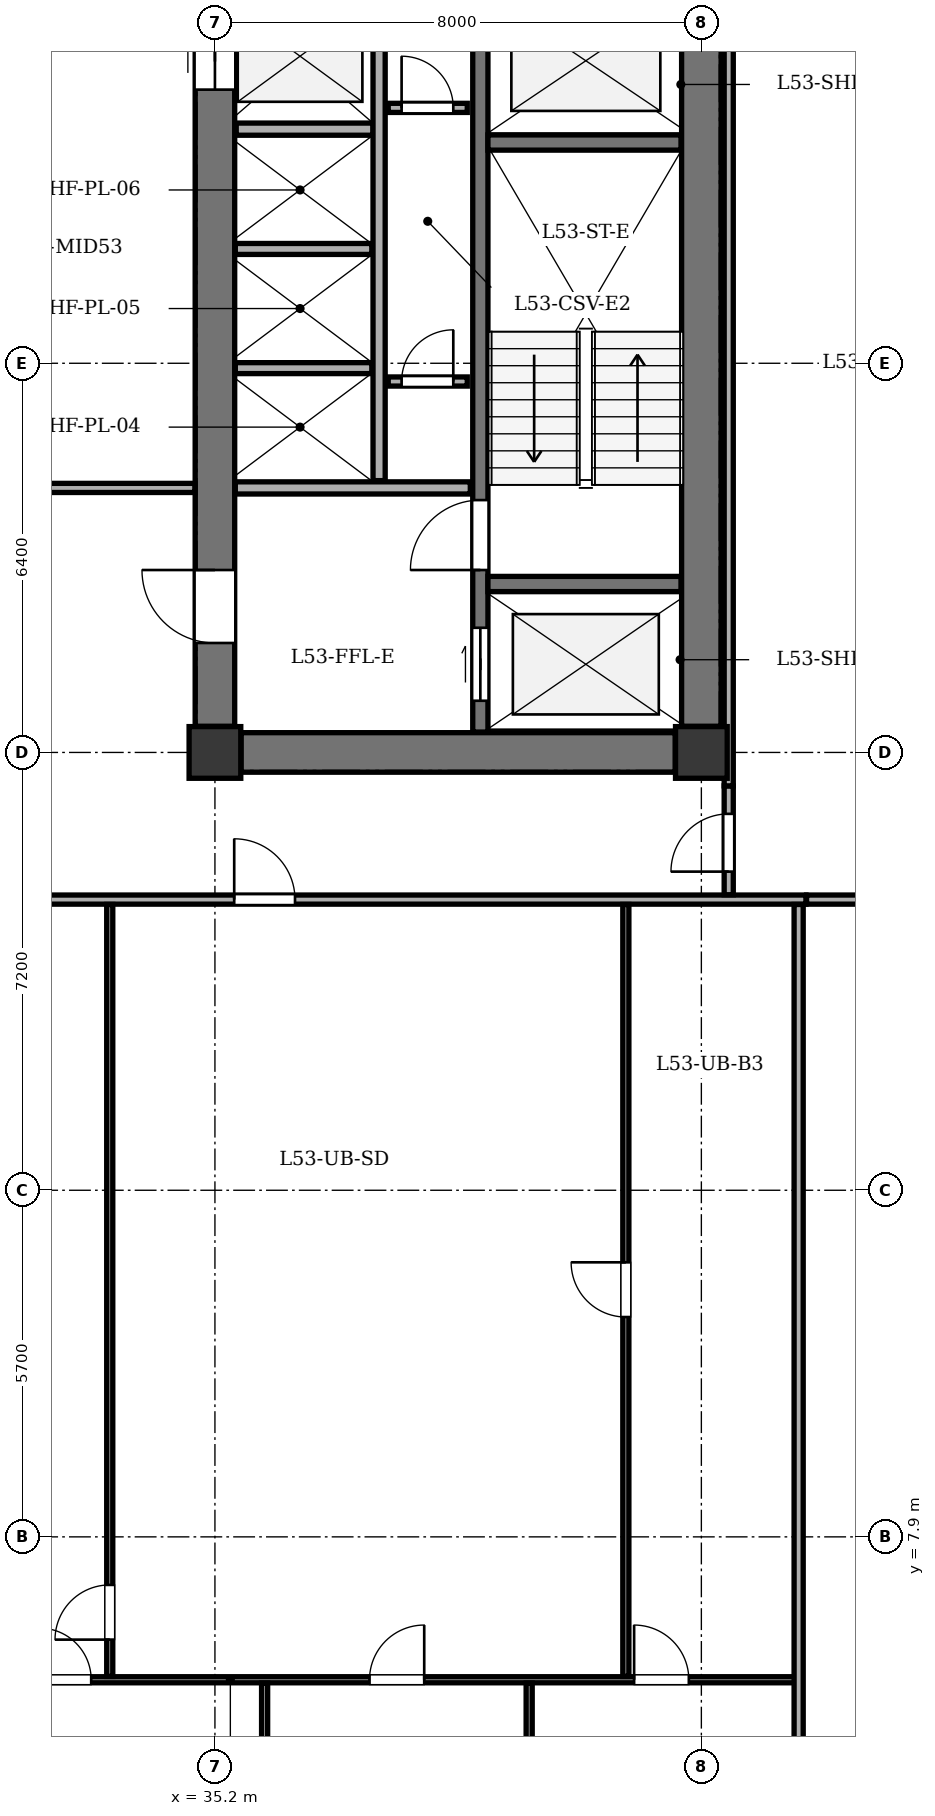
"""IFC4 building model, lengths in metres.
Left out: names, types, materials, properties, quantities, classifications, styles, units other than length and angle.
Written with IfcOpenShell. Run it as: python <this file> out.ifc"""

import sys

from ifc_helpers import new_model, si_unit, direction, frame, frame_2d, origin, origin_2d, place, context, subcontext, project, spatial, rectangle, extrude, element, fill, save


model = new_model("IFC4")
c1 = context("Model", 3, precision=1e-05, world=origin(), true_north=direction((0.0, 1.0)))
c2 = subcontext(c1, "Body", "Model", "MODEL_VIEW")
j1 = project(units=[si_unit("LENGTHUNIT", "METRE"), si_unit("PLANEANGLEUNIT", "RADIAN")], contexts=[c1])
p1 = place(None, origin())
s1 = spatial("IfcSite", under=j1, at=p1, CompositionType="ELEMENT")
p2 = place(p1, origin())
s2 = spatial("IfcBuilding", under=s1, at=p2, CompositionType="ELEMENT")
p3 = place(p2, frame((0.0, 0.0, 207.5)))
s3 = spatial("IfcBuildingStorey", under=s2, at=p3, CompositionType="ELEMENT", Elevation=207.5)
for number, where, z_axis, x_axis in (
    (1, (35.2, 20.8, 0.0), (0.0, 0.0, 1.0), (1.0, 0.0, 0.0)),
    (2, (43.2, 20.8, 0.0), (0.0, 0.0, 1.0), (1.0, 0.0, 0.0)),
):
    element("IfcColumn", number, at=place(p3, frame(where, z_axis=z_axis, x_axis=x_axis)), inside=s3, PredefinedType="COLUMN", context=c2, shape_type="SweptSolid", body=[
        extrude(rectangle(XDim=0.85, YDim=0.85, at=origin_2d()), origin(), (0.0, 0.0, 1.0), 3.4),
    ])
p4 = place(p3, frame((49.12, 7.2, 0.0), z_axis=(0.0, 0.0, 1.0), x_axis=(-0.707106781187, -0.707106781187, 0.0)))
e3 = element("IfcWall", 3, at=p4, inside=s3, PredefinedType="STANDARD", context=c2, shape_type="SweptSolid", body=[
    extrude(rectangle(XDim=6.11, YDim=0.32, at=frame_2d((3.055, 0.0))), origin(), (0.0, 0.0, 1.0), 2.725),
])
p5 = place(p4, frame((2.355, 0.0, 0.75)))
e4 = element("IfcOpeningElement", 4, at=p5, cuts=e3, PredefinedType="OPENING", context=c2, shape_type="SweptSolid", body=[
    extrude(rectangle(XDim=1.4, YDim=1.65, at=frame_2d((0.7, 0.825))), frame((0.0, 0.17, 0.0), z_axis=(0.0, -1.0, 0.0), x_axis=(1.0, 0.0, 0.0)), (0.0, 0.0, 1.0), 0.34),
])
p6 = place(p3, frame((43.2, 21.23, 0.0), z_axis=(0.0, 0.0, 1.0), x_axis=(0.0, 1.0, 0.0)))
e5 = element("IfcWall", 5, at=p6, inside=s3, PredefinedType="SHEAR", context=c2, shape_type="SweptSolid", body=[
    extrude(rectangle(XDim=11.94, YDim=0.65, at=frame_2d((5.97, 0.0))), origin(), (0.0, 0.0, 1.0), 3.1),
])
p7 = place(p3, frame((35.63, 20.8, 0.0), z_axis=(0.0, 0.0, 1.0), x_axis=(1.0, 0.0, 0.0)))
e6 = element("IfcWall", 6, at=p7, inside=s3, PredefinedType="SHEAR", context=c2, shape_type="SweptSolid", body=[
    extrude(rectangle(XDim=7.14, YDim=0.65, at=frame_2d((3.57, 0.0))), origin(), (0.0, 0.0, 1.0), 3.1),
])
p8 = place(p3, frame((35.2, 21.23, 0.0), z_axis=(0.0, 0.0, 1.0), x_axis=(0.0, 1.0, 0.0)))
e7 = element("IfcWall", 7, at=p8, inside=s3, PredefinedType="SHEAR", context=c2, shape_type="SweptSolid", body=[
    extrude(rectangle(XDim=11.94, YDim=0.65, at=frame_2d((5.97, 0.0))), origin(), (0.0, 0.0, 1.0), 3.1),
])
p9 = place(p8, frame((1.37, 0.0, 0.0)))
e8 = element("IfcOpeningElement", 8, at=p9, cuts=e7, PredefinedType="OPENING", context=c2, shape_type="SweptSolid", body=[
    extrude(rectangle(XDim=1.2, YDim=2.15, at=frame_2d((0.6, 1.075))), frame((0.0, 0.335, 0.0), z_axis=(0.0, -1.0, 0.0), x_axis=(1.0, 0.0, 0.0)), (0.0, 0.0, 1.0), 0.67),
])
p10 = place(p8, frame((10.47, 0.0, 0.0)))
e9 = element("IfcOpeningElement", 9, at=p10, cuts=e7, PredefinedType="OPENING", context=c2, shape_type="SweptSolid", body=[
    extrude(rectangle(XDim=1.1, YDim=2.1, at=frame_2d((0.55, 1.05))), frame((0.0, 0.335, 0.0), z_axis=(0.0, -1.0, 0.0), x_axis=(1.0, 0.0, 0.0)), (0.0, 0.0, 1.0), 0.67),
])
p11 = place(p3, frame((39.565, 21.135, 0.0), z_axis=(0.0, 0.0, 1.0), x_axis=(0.0, 1.0, 0.0)))
e10 = element("IfcWall", 10, at=p11, inside=s3, PredefinedType="SHEAR", context=c2, shape_type="SweptSolid", body=[
    extrude(rectangle(XDim=12.13, YDim=0.25, at=frame_2d((6.065, 0.0))), origin(), (0.0, 0.0, 1.0), 3.1),
])
p12 = place(p11, frame((0.515, 0.0, 0.0)))
e11 = element("IfcOpeningElement", 11, at=p12, cuts=e10, PredefinedType="OPENING", context=c2, shape_type="SweptSolid", body=[
    extrude(rectangle(XDim=1.2, YDim=2.15, at=frame_2d((0.6, 1.075))), frame((0.0, 0.135, 0.0), z_axis=(0.0, -1.0, 0.0), x_axis=(1.0, 0.0, 0.0)), (0.0, 0.0, 1.0), 0.27),
])
p13 = place(p11, frame((2.665, 0.0, 0.0)))
e12 = element("IfcOpeningElement", 12, at=p13, cuts=e10, PredefinedType="OPENING", context=c2, shape_type="SweptSolid", body=[
    extrude(rectangle(XDim=1.15, YDim=2.15, at=frame_2d((0.575, 1.075))), frame((0.0, 0.135, 0.0), z_axis=(0.0, -1.0, 0.0), x_axis=(1.0, 0.0, 0.0)), (0.0, 0.0, 1.0), 0.27),
])
for number, where, z_axis, x_axis in (
    (13, (39.69, 23.57, 0.0), (0.0, 0.0, 1.0), (1.0, 0.0, 0.0)),
    (14, (39.69, 30.83, 0.0), (0.0, 0.0, 1.0), (1.0, 0.0, 0.0)),
):
    element("IfcWall", number, at=place(p3, frame(where, z_axis=z_axis, x_axis=x_axis)), inside=s3, PredefinedType="SHEAR", context=c2, shape_type="SweptSolid", body=[
        extrude(rectangle(XDim=3.175, YDim=0.25, at=frame_2d((1.587, 0.0))), origin(), (0.0, 0.0, 1.0), 3.1),
    ])
p14 = place(p3, frame((35.535, 25.15, 0.0), z_axis=(0.0, 0.0, 1.0), x_axis=(1.0, 0.0, 0.0)))
e15 = element("IfcWall", 15, at=p14, inside=s3, PredefinedType="SOLIDWALL", context=c2, shape_type="SweptSolid", body=[
    extrude(rectangle(XDim=3.865, YDim=0.2, at=frame_2d((1.933, 0.0))), origin(), (0.0, 0.0, 1.0), 3.1),
])
p15 = place(p3, frame((35.55, 31.05, 0.0), z_axis=(0.0, 0.0, 1.0), x_axis=(1.0, 0.0, 0.0)))
e16 = element("IfcWall", 16, at=p15, inside=s3, PredefinedType="SOLIDWALL", context=c2, shape_type="SweptSolid", body=[
    extrude(rectangle(XDim=2.25, YDim=0.2, at=frame_2d((1.125, 0.0))), origin(), (0.0, 0.0, 1.0), 3.1),
])
p16 = place(p3, frame((37.9, 25.27, 0.0), z_axis=(0.0, 0.0, 1.0), x_axis=(0.0, 1.0, 0.0)))
e17 = element("IfcWall", 17, at=p16, inside=s3, PredefinedType="SOLIDWALL", context=c2, shape_type="SweptSolid", body=[
    extrude(rectangle(XDim=7.995, YDim=0.2, at=frame_2d((3.998, 0.0))), origin(), (0.0, 0.0, 1.0), 3.1),
])
for number, where, z_axis, x_axis in (
    (18, (35.535, 27.12, 0.0), (0.0, 0.0, 1.0), (1.0, 0.0, 0.0)),
    (19, (35.535, 29.08, 0.0), (0.0, 0.0, 1.0), (1.0, 0.0, 0.0)),
):
    element("IfcWall", number, at=place(p3, frame(where, z_axis=z_axis, x_axis=x_axis)), inside=s3, PredefinedType="PARTITIONING", context=c2, shape_type="SweptSolid", body=[
        extrude(rectangle(XDim=2.245, YDim=0.18, at=frame_2d((1.123, 0.0))), origin(), (0.0, 0.0, 1.0), 3.1),
    ])
p17 = place(p3, frame((38.05, 26.9, 0.0), z_axis=(0.0, 0.0, 1.0), x_axis=(1.0, 0.0, 0.0)))
e20 = element("IfcWall", 20, at=p17, inside=s3, PredefinedType="PARTITIONING", context=c2, shape_type="SweptSolid", body=[
    extrude(rectangle(XDim=1.3, YDim=0.15, at=frame_2d((0.65, 0.0))), origin(), (0.0, 0.0, 1.0), 3.1),
])
p18 = place(p17, frame((0.22, 0.0, 0.0)))
e21 = element("IfcOpeningElement", 21, at=p18, cuts=e20, PredefinedType="OPENING", context=c2, shape_type="SweptSolid", body=[
    extrude(rectangle(XDim=0.85, YDim=2.02, at=frame_2d((0.425, 1.01))), frame((0.0, 0.085, 0.0), z_axis=(0.0, -1.0, 0.0), x_axis=(1.0, 0.0, 0.0)), (0.0, 0.0, 1.0), 0.17),
])
p19 = place(p3, frame((38.05, 31.4, 0.0), z_axis=(0.0, 0.0, 1.0), x_axis=(1.0, 0.0, 0.0)))
e22 = element("IfcWall", 22, at=p19, inside=s3, PredefinedType="PARTITIONING", context=c2, shape_type="SweptSolid", body=[
    extrude(rectangle(XDim=1.3, YDim=0.15, at=frame_2d((0.65, 0.0))), origin(), (0.0, 0.0, 1.0), 3.1),
])
p20 = place(p19, frame((0.22, 0.0, 0.0)))
e23 = element("IfcOpeningElement", 23, at=p20, cuts=e22, PredefinedType="OPENING", context=c2, shape_type="SweptSolid", body=[
    extrude(rectangle(XDim=0.85, YDim=2.02, at=frame_2d((0.425, 1.01))), frame((0.0, 0.085, 0.0), z_axis=(0.0, -1.0, 0.0), x_axis=(1.0, 0.0, 0.0)), (0.0, 0.0, 1.0), 0.17),
])
p21 = place(p3, frame((29.35, 25.15, 0.0), z_axis=(0.0, 0.0, 1.0), x_axis=(1.0, 0.0, 0.0)))
e24 = element("IfcWall", 24, at=p21, inside=s3, PredefinedType="PARTITIONING", context=c2, shape_type="SweptSolid", body=[
    extrude(rectangle(XDim=5.52, YDim=0.15, at=frame_2d((2.76, 0.0))), origin(), (0.0, 0.0, 1.0), 3.1),
])
p22 = place(p3, frame((10.9, 18.38, 0.0), z_axis=(0.0, 0.0, 1.0), x_axis=(1.0, 0.0, 0.0)))
e25 = element("IfcWall", 25, at=p22, inside=s3, PredefinedType="PARTITIONING", context=c2, shape_type="SweptSolid", body=[
    extrude(rectangle(XDim=34.02, YDim=0.15, at=frame_2d((17.01, 0.0))), origin(), (0.0, 0.0, 1.0), 3.1),
])
p23 = place(p22, frame((7.727, 0.0, 0.0)))
e26 = element("IfcOpeningElement", 26, at=p23, cuts=e25, PredefinedType="OPENING", context=c2, shape_type="SweptSolid", body=[
    extrude(rectangle(XDim=1.0, YDim=2.1, at=frame_2d((0.5, 1.05))), frame((0.0, 0.085, 0.0), z_axis=(0.0, -1.0, 0.0), x_axis=(1.0, 0.0, 0.0)), (0.0, 0.0, 1.0), 0.17),
])
p24 = place(p22, frame((24.617, 0.0, 0.0)))
e27 = element("IfcOpeningElement", 27, at=p24, cuts=e25, PredefinedType="OPENING", context=c2, shape_type="SweptSolid", body=[
    extrude(rectangle(XDim=1.0, YDim=2.1, at=frame_2d((0.5, 1.05))), frame((0.0, 0.085, 0.0), z_axis=(0.0, -1.0, 0.0), x_axis=(1.0, 0.0, 0.0)), (0.0, 0.0, 1.0), 0.17),
])
p25 = place(p3, frame((27.314, 5.55, 0.0), z_axis=(0.0, 0.0, 1.0), x_axis=(1.0, 0.0, 0.0)))
e28 = element("IfcWall", 28, at=p25, inside=s3, PredefinedType="PARTITIONING", context=c2, shape_type="SweptSolid", body=[
    extrude(rectangle(XDim=17.526, YDim=0.1, at=frame_2d((8.763, 0.0))), origin(), (0.0, 0.0, 1.0), 3.1),
])
p26 = place(p25, frame((0.65, 0.0, 0.0)))
e29 = element("IfcOpeningElement", 29, at=p26, cuts=e28, PredefinedType="OPENING", context=c2, shape_type="SweptSolid", body=[
    extrude(rectangle(XDim=0.85, YDim=2.05, at=frame_2d((0.425, 1.025))), frame((0.0, 0.06, 0.0), z_axis=(0.0, -1.0, 0.0), x_axis=(1.0, 0.0, 0.0)), (0.0, 0.0, 1.0), 0.12),
])
p27 = place(p25, frame((5.001, 0.0, 0.0)))
e30 = element("IfcOpeningElement", 30, at=p27, cuts=e28, PredefinedType="OPENING", context=c2, shape_type="SweptSolid", body=[
    extrude(rectangle(XDim=0.85, YDim=2.05, at=frame_2d((0.425, 1.025))), frame((0.0, 0.06, 0.0), z_axis=(0.0, -1.0, 0.0), x_axis=(1.0, 0.0, 0.0)), (0.0, 0.0, 1.0), 0.12),
])
p28 = place(p25, frame((10.428, 0.0, 0.0)))
e31 = element("IfcOpeningElement", 31, at=p28, cuts=e28, PredefinedType="OPENING", context=c2, shape_type="SweptSolid", body=[
    extrude(rectangle(XDim=0.9, YDim=2.05, at=frame_2d((0.45, 1.025))), frame((0.0, 0.06, 0.0), z_axis=(0.0, -1.0, 0.0), x_axis=(1.0, 0.0, 0.0)), (0.0, 0.0, 1.0), 0.12),
])
p29 = place(p25, frame((14.78, 0.0, 0.0)))
e32 = element("IfcOpeningElement", 32, at=p29, cuts=e28, PredefinedType="OPENING", context=c2, shape_type="SweptSolid", body=[
    extrude(rectangle(XDim=0.9, YDim=2.05, at=frame_2d((0.45, 1.025))), frame((0.0, 0.06, 0.0), z_axis=(0.0, -1.0, 0.0), x_axis=(1.0, 0.0, 0.0)), (0.0, 0.0, 1.0), 0.12),
])
p30 = place(p3, frame((41.958, 5.605, 0.0), z_axis=(0.0, 0.0, 1.0), x_axis=(0.0, 1.0, 0.0)))
e33 = element("IfcWall", 33, at=p30, inside=s3, PredefinedType="PARTITIONING", context=c2, shape_type="SweptSolid", body=[
    extrude(rectangle(XDim=12.695, YDim=0.1, at=frame_2d((6.348, 0.0))), origin(), (0.0, 0.0, 1.0), 2.725),
])
p31 = place(p30, frame((5.91, 0.0, 0.0)))
e34 = element("IfcOpeningElement", 34, at=p31, cuts=e33, PredefinedType="OPENING", context=c2, shape_type="SweptSolid", body=[
    extrude(rectangle(XDim=0.9, YDim=2.05, at=frame_2d((0.45, 1.025))), frame((0.0, 0.06, 0.0), z_axis=(0.0, -1.0, 0.0), x_axis=(1.0, 0.0, 0.0)), (0.0, 0.0, 1.0), 0.12),
])
p32 = place(p3, frame((33.47, 5.605, 0.0), z_axis=(0.0, 0.0, 1.0), x_axis=(0.0, 1.0, 0.0)))
e35 = element("IfcWall", 35, at=p32, inside=s3, PredefinedType="PARTITIONING", context=c2, shape_type="SweptSolid", body=[
    extrude(rectangle(XDim=12.695, YDim=0.1, at=frame_2d((6.348, 0.0))), origin(), (0.0, 0.0, 1.0), 2.725),
])
p33 = place(p32, frame((0.605, 0.0, 0.0)))
e36 = element("IfcOpeningElement", 36, at=p33, cuts=e35, PredefinedType="OPENING", context=c2, shape_type="SweptSolid", body=[
    extrude(rectangle(XDim=0.9, YDim=2.05, at=frame_2d((0.45, 1.025))), frame((0.0, 0.06, 0.0), z_axis=(0.0, -1.0, 0.0), x_axis=(1.0, 0.0, 0.0)), (0.0, 0.0, 1.0), 0.12),
])
p34 = place(p3, frame((36.017, 3.045, 0.0), z_axis=(0.0, 0.0, 1.0), x_axis=(0.0, 1.0, 0.0)))
e37 = element("IfcWall", 37, at=p34, inside=s3, PredefinedType="PARTITIONING", context=c2, shape_type="SweptSolid", body=[
    extrude(rectangle(XDim=2.45, YDim=0.1, at=frame_2d((1.225, 0.0))), origin(), (0.0, 0.0, 1.0), 3.1),
])
p35 = place(p3, frame((40.368, 3.045, 0.0), z_axis=(0.0, 0.0, 1.0), x_axis=(0.0, 1.0, 0.0)))
e38 = element("IfcWall", 38, at=p35, inside=s3, PredefinedType="PARTITIONING", context=c2, shape_type="SweptSolid", body=[
    extrude(rectangle(XDim=2.45, YDim=0.1, at=frame_2d((1.225, 0.0))), origin(), (0.0, 0.0, 1.0), 2.725),
])
p36 = place(p3, frame((44.8, 3.045, 0.0), z_axis=(0.0, 0.0, 1.0), x_axis=(0.0, 1.0, 0.0)))
e39 = element("IfcWall", 39, at=p36, inside=s3, PredefinedType="PARTITIONING", context=c2, shape_type="SweptSolid", body=[
    extrude(rectangle(XDim=15.255, YDim=0.15, at=frame_2d((7.627, 0.0))), origin(), (0.0, 0.0, 1.0), 3.1),
])
p37 = place(p3, frame((44.93, 18.38, 0.0), z_axis=(0.0, 0.0, 1.0), x_axis=(1.0, 0.0, 0.0)))
e40 = element("IfcWall", 40, at=p37, inside=s3, PredefinedType="PARTITIONING", context=c2, shape_type="SweptSolid", body=[
    extrude(rectangle(XDim=4.025, YDim=0.15, at=frame_2d((2.013, 0.0))), origin(), (0.0, 0.0, 1.0), 3.1),
])
p38 = place(p3, frame((43.65, 18.46, 0.0), z_axis=(0.0, 0.0, 1.0), x_axis=(0.0, 1.0, 0.0)))
e41 = element("IfcWall", 41, at=p38, inside=s3, PredefinedType="PARTITIONING", context=c2, shape_type="SweptSolid", body=[
    extrude(rectangle(XDim=1.79, YDim=0.15, at=frame_2d((0.895, 0.0))), origin(), (0.0, 0.0, 1.0), 3.1),
])
p39 = place(p38, frame((0.38, 0.0, 0.0)))
e42 = element("IfcOpeningElement", 42, at=p39, cuts=e41, PredefinedType="OPENING", context=c2, shape_type="SweptSolid", body=[
    extrude(rectangle(XDim=0.95, YDim=2.1, at=frame_2d((0.475, 1.05))), frame((0.0, 0.085, 0.0), z_axis=(0.0, -1.0, 0.0), x_axis=(1.0, 0.0, 0.0)), (0.0, 0.0, 1.0), 0.17),
])
p40 = place(p3, frame((43.65, 20.25, 0.0), z_axis=(0.0, 0.0, 1.0), x_axis=(0.0, 1.0, 0.0)))
e43 = element("IfcWall", 43, at=p40, inside=s3, PredefinedType="PARTITIONING", context=c2, shape_type="SweptSolid", body=[
    extrude(rectangle(XDim=13.27, YDim=0.15, at=frame_2d((6.635, 0.0))), origin(), (0.0, 0.0, 1.0), 3.1),
])
p41 = place(p9, origin())
e44 = element("IfcDoor", 44, at=p41, inside=s3, OperationType="SINGLE_SWING_RIGHT", PredefinedType="DOOR", context=c2, shape_type="SweptSolid", body=[
    extrude(rectangle(XDim=1.2, YDim=2.15, at=frame_2d((0.6, 1.075))), frame((0.0, 0.025, 0.0), z_axis=(0.0, -1.0, 0.0), x_axis=(1.0, 0.0, 0.0)), (0.0, 0.0, 1.0), 0.05),
])
fill(e8, e44)
p42 = place(p10, origin())
e45 = element("IfcDoor", 45, at=p42, inside=s3, OperationType="DOUBLE_DOOR_SLIDING", PredefinedType="DOOR", context=c2, shape_type="SweptSolid", body=[
    extrude(rectangle(XDim=1.1, YDim=2.1, at=frame_2d((0.55, 1.05))), frame((0.0, 0.025, 0.0), z_axis=(0.0, -1.0, 0.0), x_axis=(1.0, 0.0, 0.0)), (0.0, 0.0, 1.0), 0.05),
])
fill(e9, e45)
p43 = place(p12, origin())
e46 = element("IfcDoor", 46, at=p43, inside=s3, OperationType="DOUBLE_DOOR_SLIDING", PredefinedType="DOOR", context=c2, shape_type="SweptSolid", body=[
    extrude(rectangle(XDim=1.2, YDim=2.15, at=frame_2d((0.6, 1.075))), frame((0.0, 0.025, 0.0), z_axis=(0.0, -1.0, 0.0), x_axis=(1.0, 0.0, 0.0)), (0.0, 0.0, 1.0), 0.05),
])
fill(e11, e46)
p44 = place(p13, origin())
e47 = element("IfcDoor", 47, at=p44, inside=s3, OperationType="SINGLE_SWING_LEFT", PredefinedType="DOOR", context=c2, shape_type="SweptSolid", body=[
    extrude(rectangle(XDim=1.15, YDim=2.15, at=frame_2d((0.575, 1.075))), frame((0.0, 0.025, 0.0), z_axis=(0.0, -1.0, 0.0), x_axis=(1.0, 0.0, 0.0)), (0.0, 0.0, 1.0), 0.05),
])
fill(e12, e47)
p45 = place(p18, origin())
e48 = element("IfcDoor", 48, at=p45, inside=s3, OperationType="SINGLE_SWING_RIGHT", PredefinedType="DOOR", context=c2, shape_type="SweptSolid", body=[
    extrude(rectangle(XDim=0.85, YDim=2.02, at=frame_2d((0.425, 1.01))), frame((0.0, 0.025, 0.0), z_axis=(0.0, -1.0, 0.0), x_axis=(1.0, 0.0, 0.0)), (0.0, 0.0, 1.0), 0.05),
])
fill(e21, e48)
p46 = place(p20, origin())
e49 = element("IfcDoor", 49, at=p46, inside=s3, OperationType="SINGLE_SWING_LEFT", PredefinedType="DOOR", context=c2, shape_type="SweptSolid", body=[
    extrude(rectangle(XDim=0.85, YDim=2.02, at=frame_2d((0.425, 1.01))), frame((0.0, 0.025, 0.0), z_axis=(0.0, -1.0, 0.0), x_axis=(1.0, 0.0, 0.0)), (0.0, 0.0, 1.0), 0.05),
])
fill(e23, e49)
p47 = place(p24, origin())
e50 = element("IfcDoor", 50, at=p47, inside=s3, OperationType="SINGLE_SWING_LEFT", PredefinedType="DOOR", context=c2, shape_type="SweptSolid", body=[
    extrude(rectangle(XDim=1.0, YDim=2.1, at=frame_2d((0.5, 1.05))), frame((0.0, 0.025, 0.0), z_axis=(0.0, -1.0, 0.0), x_axis=(1.0, 0.0, 0.0)), (0.0, 0.0, 1.0), 0.05),
])
fill(e27, e50)
p48 = place(p31, origin())
e51 = element("IfcDoor", 51, at=p48, inside=s3, OperationType="SINGLE_SWING_RIGHT", PredefinedType="DOOR", context=c2, shape_type="SweptSolid", body=[
    extrude(rectangle(XDim=0.9, YDim=2.05, at=frame_2d((0.45, 1.025))), frame((0.0, 0.025, 0.0), z_axis=(0.0, -1.0, 0.0), x_axis=(1.0, 0.0, 0.0)), (0.0, 0.0, 1.0), 0.05),
])
fill(e34, e51)
p49 = place(p33, origin())
e52 = element("IfcDoor", 52, at=p49, inside=s3, OperationType="SINGLE_SWING_LEFT", PredefinedType="DOOR", context=c2, shape_type="SweptSolid", body=[
    extrude(rectangle(XDim=0.9, YDim=2.05, at=frame_2d((0.45, 1.025))), frame((0.0, 0.025, 0.0), z_axis=(0.0, -1.0, 0.0), x_axis=(1.0, 0.0, 0.0)), (0.0, 0.0, 1.0), 0.05),
])
fill(e36, e52)
p50 = place(p27, origin())
e53 = element("IfcDoor", 53, at=p50, inside=s3, OperationType="SINGLE_SWING_LEFT", PredefinedType="DOOR", context=c2, shape_type="SweptSolid", body=[
    extrude(rectangle(XDim=0.85, YDim=2.05, at=frame_2d((0.425, 1.025))), frame((0.0, 0.025, 0.0), z_axis=(0.0, -1.0, 0.0), x_axis=(1.0, 0.0, 0.0)), (0.0, 0.0, 1.0), 0.05),
])
fill(e30, e53)
p51 = place(p28, origin())
e54 = element("IfcDoor", 54, at=p51, inside=s3, OperationType="SINGLE_SWING_RIGHT", PredefinedType="DOOR", context=c2, shape_type="SweptSolid", body=[
    extrude(rectangle(XDim=0.9, YDim=2.05, at=frame_2d((0.45, 1.025))), frame((0.0, 0.025, 0.0), z_axis=(0.0, -1.0, 0.0), x_axis=(1.0, 0.0, 0.0)), (0.0, 0.0, 1.0), 0.05),
])
fill(e31, e54)
p52 = place(p29, origin())
e55 = element("IfcDoor", 55, at=p52, inside=s3, OperationType="SINGLE_SWING_LEFT", PredefinedType="DOOR", context=c2, shape_type="SweptSolid", body=[
    extrude(rectangle(XDim=0.9, YDim=2.05, at=frame_2d((0.45, 1.025))), frame((0.0, 0.025, 0.0), z_axis=(0.0, -1.0, 0.0), x_axis=(1.0, 0.0, 0.0)), (0.0, 0.0, 1.0), 0.05),
])
fill(e32, e55)
p53 = place(p39, origin())
e56 = element("IfcDoor", 56, at=p53, inside=s3, OperationType="SINGLE_SWING_LEFT", PredefinedType="DOOR", context=c2, shape_type="SweptSolid", body=[
    extrude(rectangle(XDim=0.95, YDim=2.1, at=frame_2d((0.475, 1.05))), frame((0.0, 0.025, 0.0), z_axis=(0.0, -1.0, 0.0), x_axis=(1.0, 0.0, 0.0)), (0.0, 0.0, 1.0), 0.05),
])
fill(e42, e56)
save(model, sys.argv[1])
